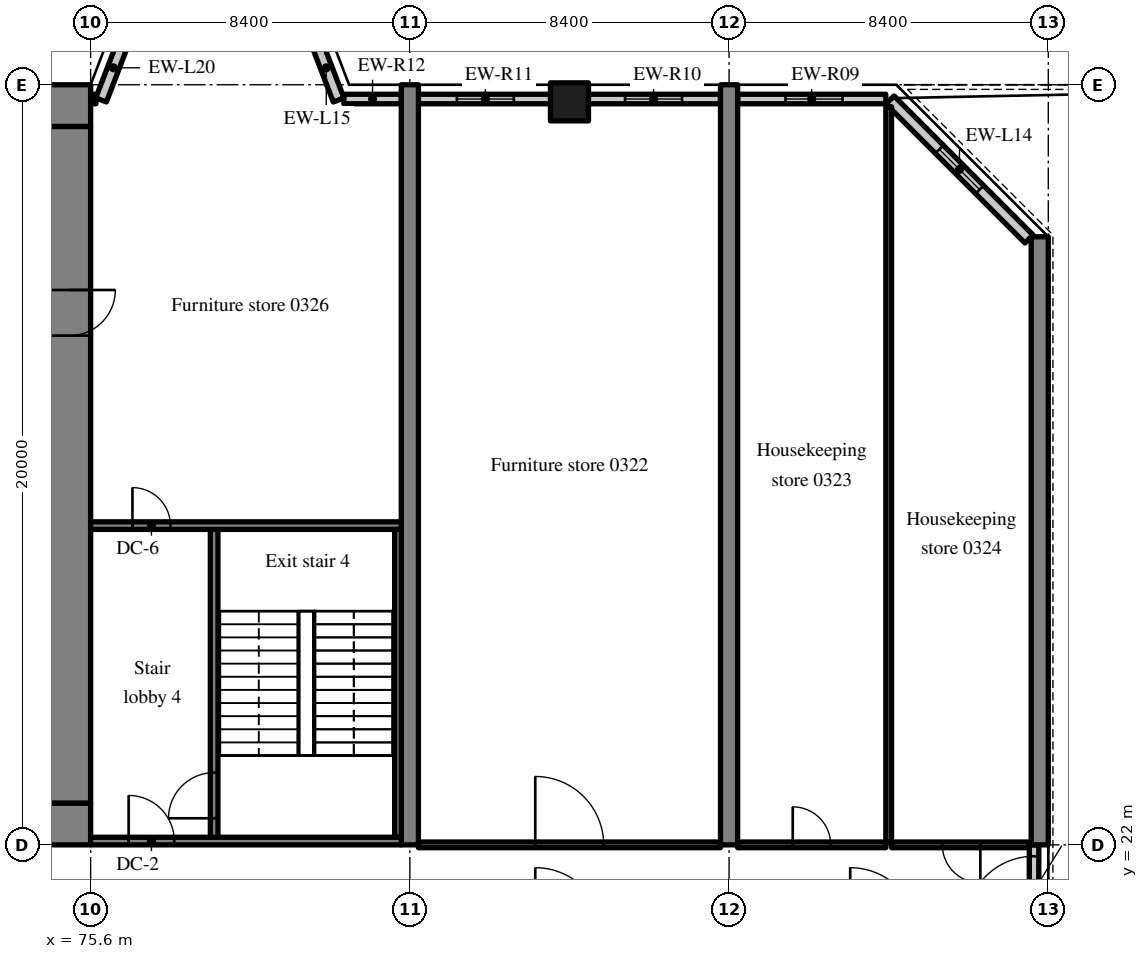
"""IFC4 building model, lengths in metres.
Left out: names, types, materials, properties, quantities, classifications, styles, units other than length and angle.
Written with IfcOpenShell. Run it as: python <this file> out.ifc"""

import sys

from ifc_helpers import new_model, si_unit, direction, frame, frame_2d, origin, origin_2d, place, context, subcontext, project, spatial, rectangle, extrude, source, transform, mapped, element, fill, save


model = new_model("IFC4")
c1 = context("Model", 3, precision=1e-05, world=origin(), true_north=direction((0.0, 1.0)))
c2 = subcontext(c1, "Body", "Model", "MODEL_VIEW")
j1 = project(units=[si_unit("LENGTHUNIT", "METRE"), si_unit("PLANEANGLEUNIT", "RADIAN")], contexts=[c1])
p1 = place(None, origin())
s1 = spatial("IfcSite", under=j1, at=p1, CompositionType="ELEMENT")
p2 = place(p1, origin())
s2 = spatial("IfcBuilding", under=s1, at=p2, CompositionType="ELEMENT")
p3 = place(p2, frame((0.0, 0.0, 18.0)))
s3 = spatial("IfcBuildingStorey", under=s2, at=p3, CompositionType="ELEMENT", Elevation=18.0)
m1 = source(origin(), c2, "Body", "SweptSolid", [
    extrude(rectangle(XDim=50.4, YDim=1.1, at=frame_2d((25.2, 0.0))), origin(), (0.0, 0.0, 1.0), 4.72),
])
p4 = place(p3, frame((25.2, 22.55, 0.0), z_axis=(0.0, 0.0, 1.0), x_axis=(1.0, 0.0, 0.0)))
e1 = element("IfcWall", 1, at=p4, inside=s3, PredefinedType="SHEAR", context=c2, shape_type="MappedRepresentation", body=[
    mapped(m1, transform((0.0, 0.0, 0.0), scale=1.0)),
])
m2 = source(origin(), c2, "Body", "SweptSolid", [
    extrude(rectangle(XDim=1.8, YDim=2.1, at=frame_2d((0.9, 1.05))), frame((0.0, 0.56, 0.0), z_axis=(0.0, -1.0, 0.0), x_axis=(1.0, 0.0, 0.0)), (0.0, 0.0, 1.0), 1.12),
])
p5 = place(p4, frame((15.9, 0.0, 0.0)))
e2 = element("IfcOpeningElement", 2, at=p5, cuts=e1, PredefinedType="OPENING", context=c2, shape_type="MappedRepresentation", body=[
    mapped(m2, transform((0.0, 0.0, 0.0), scale=1.0)),
])
m3 = source(origin(), c2, "Body", "SweptSolid", [
    extrude(rectangle(XDim=1.2, YDim=2.1, at=frame_2d((0.6, 1.05))), frame((0.0, 0.56, 0.0), z_axis=(0.0, -1.0, 0.0), x_axis=(1.0, 0.0, 0.0)), (0.0, 0.0, 1.0), 1.12),
])
p6 = place(p4, frame((27.0, 0.0, 0.0)))
e3 = element("IfcOpeningElement", 3, at=p6, cuts=e1, PredefinedType="OPENING", context=c2, shape_type="MappedRepresentation", body=[
    mapped(m3, transform((0.0, 0.0, 0.0), scale=1.0)),
])
m4 = source(origin(), c2, "Body", "SweptSolid", [
    extrude(rectangle(XDim=0.9, YDim=2.1, at=frame_2d((0.45, 1.05))), frame((0.0, 0.56, 0.0), z_axis=(0.0, -1.0, 0.0), x_axis=(1.0, 0.0, 0.0)), (0.0, 0.0, 1.0), 1.12),
])
p7 = place(p4, frame((34.5, 0.0, 0.0)))
e4 = element("IfcOpeningElement", 4, at=p7, cuts=e1, PredefinedType="OPENING", context=c2, shape_type="MappedRepresentation", body=[
    mapped(m4, transform((0.0, 0.0, 0.0), scale=1.0)),
])
p8 = place(p4, frame((31.5, 0.0, 0.0)))
e5 = element("IfcOpeningElement", 5, at=p8, cuts=e1, PredefinedType="OPENING", context=c2, shape_type="MappedRepresentation", body=[
    mapped(m4, transform((0.0, 0.0, 0.0), scale=1.0)),
])
p9 = place(p4, frame((39.75, 0.0, 0.0)))
e6 = element("IfcOpeningElement", 6, at=p9, cuts=e1, PredefinedType="OPENING", context=c2, shape_type="MappedRepresentation", body=[
    mapped(m4, transform((0.0, 0.0, 0.0), scale=1.0)),
])
p10 = place(p4, frame((36.75, 0.0, 0.0)))
e7 = element("IfcOpeningElement", 7, at=p10, cuts=e1, PredefinedType="OPENING", context=c2, shape_type="MappedRepresentation", body=[
    mapped(m4, transform((0.0, 0.0, 0.0), scale=1.0)),
])
p11 = place(p4, frame((6.425, 0.0, 0.0)))
e8 = element("IfcOpeningElement", 8, at=p11, cuts=e1, PredefinedType="OPENING", context=c2, shape_type="MappedRepresentation", body=[
    mapped(m3, transform((0.0, 0.0, 0.0), scale=1.0)),
])
p12 = place(p4, frame((47.675, 0.0, 0.0)))
e9 = element("IfcOpeningElement", 9, at=p12, cuts=e1, PredefinedType="OPENING", context=c2, shape_type="MappedRepresentation", body=[
    mapped(m3, transform((0.0, 0.0, 0.0), scale=1.0)),
])
p13 = place(p3, frame((25.2, 41.45, 0.0), z_axis=(0.0, 0.0, 1.0), x_axis=(1.0, 0.0, 0.0)))
e10 = element("IfcWall", 10, at=p13, inside=s3, PredefinedType="SHEAR", context=c2, shape_type="MappedRepresentation", body=[
    mapped(m1, transform((0.0, 0.0, 0.0), scale=1.0)),
])
m5 = source(origin(), c2, "Body", "SweptSolid", [
    extrude(rectangle(XDim=17.8, YDim=1.1, at=frame_2d((8.9, 0.0))), origin(), (0.0, 0.0, 1.0), 4.72),
])
p14 = place(p3, frame((75.05, 23.1, 0.0), z_axis=(0.0, 0.0, 1.0), x_axis=(0.0, 1.0, 0.0)))
e11 = element("IfcWall", 11, at=p14, inside=s3, PredefinedType="SHEAR", context=c2, shape_type="MappedRepresentation", body=[
    mapped(m5, transform((0.0, 0.0, 0.0), scale=1.0)),
])
p15 = place(p14, frame((12.3, 0.0, 0.0)))
e12 = element("IfcOpeningElement", 12, at=p15, cuts=e11, PredefinedType="OPENING", context=c2, shape_type="MappedRepresentation", body=[
    mapped(m3, transform((0.0, 0.0, 0.0), scale=1.0)),
])
m6 = source(origin(), c2, "Body", "SweptSolid", [
    extrude(rectangle(XDim=20.0, YDim=0.45, at=frame_2d((10.0, 0.0))), origin(), (0.0, 0.0, 1.0), 4.72),
])
for number, where, z_axis, x_axis in (
    (13, (84.0, 22.0, 0.0), (0.0, 0.0, 1.0), (0.0, 1.0, 0.0)),
    (14, (92.4, 22.0, 0.0), (0.0, 0.0, 1.0), (0.0, 1.0, 0.0)),
):
    element("IfcWall", number, at=place(p3, frame(where, z_axis=z_axis, x_axis=x_axis)), inside=s3, PredefinedType="SHEAR", context=c2, shape_type="MappedRepresentation", body=[
        mapped(m6, transform((0.0, 0.0, 0.0), scale=1.0)),
    ])
m7 = source(origin(), c2, "Body", "SweptSolid", [
    extrude(rectangle(XDim=16.0, YDim=0.45, at=frame_2d((8.0, 0.0))), origin(), (0.0, 0.0, 1.0), 4.72),
])
p16 = place(p3, frame((100.575, 22.0, 0.0), z_axis=(0.0, 0.0, 1.0), x_axis=(0.0, 1.0, 0.0)))
e15 = element("IfcWall", 15, at=p16, inside=s3, PredefinedType="SHEAR", context=c2, shape_type="MappedRepresentation", body=[
    mapped(m7, transform((0.0, 0.0, 0.0), scale=1.0)),
])
m8 = source(origin(), c2, "Body", "SweptSolid", [
    extrude(rectangle(XDim=1.0, YDim=1.0, at=origin_2d()), origin(), (0.0, 0.0, 1.0), 4.72),
])
p17 = place(p3, frame((88.2, 41.55, 0.0), z_axis=(0.0, 0.0, 1.0), x_axis=(1.0, 0.0, 0.0)))
e16 = element("IfcColumn", 16, at=p17, inside=s3, PredefinedType="COLUMN", context=c2, shape_type="MappedRepresentation", body=[
    mapped(m8, transform((0.0, 0.0, 0.0), scale=1.0)),
])
m9 = source(origin(), c2, "Body", "SweptSolid", [
    extrude(rectangle(XDim=2.4, YDim=0.25, at=frame_2d((1.2, 0.0))), origin(), (0.0, 0.0, 1.0), 3.82),
])
p18 = place(p3, frame((100.425, 19.6, 0.0), z_axis=(0.0, 0.0, 1.0), x_axis=(0.0, 1.0, 0.0)))
e17 = element("IfcWall", 17, at=p18, inside=s3, PredefinedType="SOLIDWALL", context=c2, shape_type="MappedRepresentation", body=[
    mapped(m9, transform((0.0, 0.0, 0.0), scale=1.0)),
])
m10 = source(origin(), c2, "Body", "SweptSolid", [
    extrude(rectangle(XDim=1.8, YDim=2.4, at=frame_2d((0.9, 1.2))), frame((0.0, 0.135, 0.0), z_axis=(0.0, -1.0, 0.0), x_axis=(1.0, 0.0, 0.0)), (0.0, 0.0, 1.0), 0.27),
])
p19 = place(p18, frame((0.3, 0.0, 0.0)))
e18 = element("IfcOpeningElement", 18, at=p19, cuts=e17, PredefinedType="OPENING", context=c2, shape_type="MappedRepresentation", body=[
    mapped(m10, transform((0.0, 0.0, 0.0), scale=1.0)),
])
m11 = source(origin(), c2, "Body", "SweptSolid", [
    extrude(rectangle(XDim=5.173, YDim=0.3, at=frame_2d((2.586, 0.0))), origin(), (0.0, 0.0, 1.0), 3.97),
])
p20 = place(p3, frame((100.292, 37.942, 0.0), z_axis=(0.0, 0.0, 1.0), x_axis=(-0.707106781187, 0.707106781187, 0.0)))
e19 = element("IfcWall", 19, at=p20, inside=s3, PredefinedType="SOLIDWALL", context=c2, shape_type="MappedRepresentation", body=[
    mapped(m11, transform((0.0, 0.0, 0.0), scale=1.0)),
])
m12 = source(origin(), c2, "Body", "SweptSolid", [
    extrude(rectangle(XDim=1.5, YDim=1.5, at=frame_2d((0.75, 0.75))), frame((0.0, 0.16, 0.0), z_axis=(0.0, -1.0, 0.0), x_axis=(1.0, 0.0, 0.0)), (0.0, 0.0, 1.0), 0.32),
])
p21 = place(p20, frame((1.836, 0.0, 0.9)))
e20 = element("IfcOpeningElement", 20, at=p21, cuts=e19, PredefinedType="OPENING", context=c2, shape_type="MappedRepresentation", body=[
    mapped(m12, transform((0.0, 0.0, 0.0), scale=1.0)),
])
m13 = source(origin(), c2, "Body", "SweptSolid", [
    extrude(rectangle(XDim=3.9, YDim=0.25, at=frame_2d((1.95, 0.0))), origin(), (0.0, 0.0, 1.0), 3.97),
])
p22 = place(p3, frame((96.525, 41.625, 0.0), z_axis=(0.0, 0.0, 1.0), x_axis=(-1.0, 0.0, 0.0)))
e21 = element("IfcWall", 21, at=p22, inside=s3, PredefinedType="SOLIDWALL", context=c2, shape_type="MappedRepresentation", body=[
    mapped(m13, transform((0.0, 0.0, 0.0), scale=1.0)),
])
m14 = source(origin(), c2, "Body", "SweptSolid", [
    extrude(rectangle(XDim=1.5, YDim=1.5, at=frame_2d((0.75, 0.75))), frame((0.0, 0.135, 0.0), z_axis=(0.0, -1.0, 0.0), x_axis=(1.0, 0.0, 0.0)), (0.0, 0.0, 1.0), 0.27),
])
p23 = place(p22, frame((1.14, 0.0, 0.9)))
e22 = element("IfcOpeningElement", 22, at=p23, cuts=e21, PredefinedType="OPENING", context=c2, shape_type="MappedRepresentation", body=[
    mapped(m14, transform((0.0, 0.0, 0.0), scale=1.0)),
])
m15 = source(origin(), c2, "Body", "SweptSolid", [
    extrude(rectangle(XDim=3.525, YDim=0.25, at=frame_2d((1.763, 0.0))), origin(), (0.0, 0.0, 1.0), 3.97),
])
p24 = place(p3, frame((92.175, 41.625, 0.0), z_axis=(0.0, 0.0, 1.0), x_axis=(-1.0, 0.0, 0.0)))
e23 = element("IfcWall", 23, at=p24, inside=s3, PredefinedType="SOLIDWALL", context=c2, shape_type="MappedRepresentation", body=[
    mapped(m15, transform((0.0, 0.0, 0.0), scale=1.0)),
])
p25 = place(p24, frame((1.012, 0.0, 0.9)))
e24 = element("IfcOpeningElement", 24, at=p25, cuts=e23, PredefinedType="OPENING", context=c2, shape_type="MappedRepresentation", body=[
    mapped(m14, transform((0.0, 0.0, 0.0), scale=1.0)),
])
m16 = source(origin(), c2, "Body", "SweptSolid", [
    extrude(rectangle(XDim=3.525, YDim=0.25, at=frame_2d((1.762, 0.0))), origin(), (0.0, 0.0, 1.0), 3.97),
])
p26 = place(p3, frame((87.75, 41.625, 0.0), z_axis=(0.0, 0.0, 1.0), x_axis=(-1.0, 0.0, 0.0)))
e25 = element("IfcWall", 25, at=p26, inside=s3, PredefinedType="SOLIDWALL", context=c2, shape_type="MappedRepresentation", body=[
    mapped(m16, transform((0.0, 0.0, 0.0), scale=1.0)),
])
p27 = place(p26, frame((1.012, 0.0, 0.9)))
e26 = element("IfcOpeningElement", 26, at=p27, cuts=e25, PredefinedType="OPENING", context=c2, shape_type="MappedRepresentation", body=[
    mapped(m14, transform((0.0, 0.0, 0.0), scale=1.0)),
])
m17 = source(origin(), c2, "Body", "SweptSolid", [
    extrude(rectangle(XDim=1.513, YDim=0.25, at=frame_2d((0.756, 0.0))), origin(), (0.0, 0.0, 1.0), 3.97),
])
p28 = place(p3, frame((83.775, 41.625, 0.0), z_axis=(0.0, 0.0, 1.0), x_axis=(-1.0, 0.0, 0.0)))
e27 = element("IfcWall", 27, at=p28, inside=s3, PredefinedType="SOLIDWALL", context=c2, shape_type="MappedRepresentation", body=[
    mapped(m17, transform((0.0, 0.0, 0.0), scale=1.0)),
])
m18 = source(origin(), c2, "Body", "SweptSolid", [
    extrude(rectangle(XDim=1.812, YDim=0.3, at=frame_2d((0.906, 0.0))), origin(), (0.0, 0.0, 1.0), 4.72),
])
for number, where, z_axis, x_axis in (
    (28, (82.125, 41.6, 0.0), (0.0, 0.0, 1.0), (-0.358, 0.934, 0.0)),
    (29, (76.523, 43.292, 0.0), (0.0, 0.0, 1.0), (-0.358, -0.934, 0.0)),
):
    element("IfcWall", number, at=place(p3, frame(where, z_axis=z_axis, x_axis=x_axis)), inside=s3, PredefinedType="SOLIDWALL", context=c2, shape_type="MappedRepresentation", body=[
        mapped(m18, transform((0.0, 0.0, 0.0), scale=1.0)),
    ])
m19 = source(origin(), c2, "Body", "SweptSolid", [
    extrude(rectangle(XDim=0.138, YDim=0.25, at=frame_2d((0.069, 0.0))), origin(), (0.0, 0.0, 1.0), 3.97),
])
p29 = place(p3, frame((75.738, 41.625, 0.0), z_axis=(0.0, 0.0, 1.0), x_axis=(-1.0, 0.0, 0.0)))
e30 = element("IfcWall", 30, at=p29, inside=s3, PredefinedType="SOLIDWALL", context=c2, shape_type="MappedRepresentation", body=[
    mapped(m19, transform((0.0, 0.0, 0.0), scale=1.0)),
])
m20 = source(origin(), c2, "Body", "SweptSolid", [
    extrude(rectangle(XDim=8.3, YDim=0.2, at=frame_2d((4.15, 0.0))), origin(), (0.0, 0.0, 1.0), 4.72),
])
p30 = place(p3, frame((78.85, 22.1, 0.0), z_axis=(0.0, 0.0, 1.0), x_axis=(0.0, 1.0, 0.0)))
e31 = element("IfcWall", 31, at=p30, inside=s3, PredefinedType="SOLIDWALL", context=c2, shape_type="MappedRepresentation", body=[
    mapped(m20, transform((0.0, 0.0, 0.0), scale=1.0)),
])
m21 = source(origin(), c2, "Body", "SweptSolid", [
    extrude(rectangle(XDim=1.2, YDim=2.1, at=frame_2d((0.6, 1.05))), frame((0.0, 0.11, 0.0), z_axis=(0.0, -1.0, 0.0), x_axis=(1.0, 0.0, 0.0)), (0.0, 0.0, 1.0), 0.22),
])
p31 = place(p30, frame((0.6, 0.0, 0.0)))
e32 = element("IfcOpeningElement", 32, at=p31, cuts=e31, PredefinedType="OPENING", context=c2, shape_type="MappedRepresentation", body=[
    mapped(m21, transform((0.0, 0.0, 0.0), scale=1.0)),
])
m22 = source(origin(), c2, "Body", "SweptSolid", [
    extrude(rectangle(XDim=8.175, YDim=0.2, at=frame_2d((4.087, 0.0))), origin(), (0.0, 0.0, 1.0), 4.72),
])
p32 = place(p3, frame((83.775, 22.1, 0.0), z_axis=(0.0, 0.0, 1.0), x_axis=(-1.0, 0.0, 0.0)))
e33 = element("IfcWall", 33, at=p32, inside=s3, PredefinedType="SOLIDWALL", context=c2, shape_type="MappedRepresentation", body=[
    mapped(m22, transform((0.0, 0.0, 0.0), scale=1.0)),
])
p33 = place(p32, frame((5.975, 0.0, 0.0)))
e34 = element("IfcOpeningElement", 34, at=p33, cuts=e33, PredefinedType="OPENING", context=c2, shape_type="MappedRepresentation", body=[
    mapped(m21, transform((0.0, 0.0, 0.0), scale=1.0)),
])
p34 = place(p3, frame((83.775, 30.4, 0.0), z_axis=(0.0, 0.0, 1.0), x_axis=(-1.0, 0.0, 0.0)))
e35 = element("IfcWall", 35, at=p34, inside=s3, PredefinedType="SOLIDWALL", context=c2, shape_type="MappedRepresentation", body=[
    mapped(m22, transform((0.0, 0.0, 0.0), scale=1.0)),
])
m23 = source(origin(), c2, "Body", "SweptSolid", [
    extrude(rectangle(XDim=1.0, YDim=2.1, at=frame_2d((0.5, 1.05))), frame((0.0, 0.11, 0.0), z_axis=(0.0, -1.0, 0.0), x_axis=(1.0, 0.0, 0.0)), (0.0, 0.0, 1.0), 0.22),
])
p35 = place(p34, frame((6.075, 0.0, 0.0)))
e36 = element("IfcOpeningElement", 36, at=p35, cuts=e35, PredefinedType="OPENING", context=c2, shape_type="MappedRepresentation", body=[
    mapped(m23, transform((0.0, 0.0, 0.0), scale=1.0)),
])
m24 = source(origin(), c2, "Body", "SweptSolid", [
    extrude(rectangle(XDim=8.1, YDim=0.175, at=frame_2d((4.05, 0.0))), origin(), (0.0, 0.0, 1.0), 4.72),
])
p36 = place(p3, frame((83.688, 22.2, 0.0), z_axis=(0.0, 0.0, 1.0), x_axis=(0.0, 1.0, 0.0)))
e37 = element("IfcWall", 37, at=p36, inside=s3, PredefinedType="SOLIDWALL", context=c2, shape_type="MappedRepresentation", body=[
    mapped(m24, transform((0.0, 0.0, 0.0), scale=1.0)),
])
m25 = source(origin(), c2, "Body", "SweptSolid", [
    extrude(rectangle(XDim=7.95, YDim=0.15, at=frame_2d((3.975, 0.0))), origin(), (0.0, 0.0, 1.0), 4.02),
])
p37 = place(p3, frame((84.225, 22.0, 0.0), z_axis=(0.0, 0.0, 1.0), x_axis=(1.0, 0.0, 0.0)))
e38 = element("IfcWall", 38, at=p37, inside=s3, PredefinedType="PARTITIONING", context=c2, shape_type="MappedRepresentation", body=[
    mapped(m25, transform((0.0, 0.0, 0.0), scale=1.0)),
])
m26 = source(origin(), c2, "Body", "SweptSolid", [
    extrude(rectangle(XDim=1.8, YDim=2.1, at=frame_2d((0.9, 1.05))), frame((0.0, 0.085, 0.0), z_axis=(0.0, -1.0, 0.0), x_axis=(1.0, 0.0, 0.0)), (0.0, 0.0, 1.0), 0.17),
])
p38 = place(p37, frame((3.075, 0.0, 0.0)))
e39 = element("IfcOpeningElement", 39, at=p38, cuts=e38, PredefinedType="OPENING", context=c2, shape_type="MappedRepresentation", body=[
    mapped(m26, transform((0.0, 0.0, 0.0), scale=1.0)),
])
m27 = source(origin(), c2, "Body", "SweptSolid", [
    extrude(rectangle(XDim=3.9, YDim=0.15, at=frame_2d((1.95, 0.0))), origin(), (0.0, 0.0, 1.0), 4.02),
])
p39 = place(p3, frame((92.625, 22.0, 0.0), z_axis=(0.0, 0.0, 1.0), x_axis=(1.0, 0.0, 0.0)))
e40 = element("IfcWall", 40, at=p39, inside=s3, PredefinedType="PARTITIONING", context=c2, shape_type="MappedRepresentation", body=[
    mapped(m27, transform((0.0, 0.0, 0.0), scale=1.0)),
])
m28 = source(origin(), c2, "Body", "SweptSolid", [
    extrude(rectangle(XDim=1.0, YDim=2.1, at=frame_2d((0.5, 1.05))), frame((0.0, 0.085, 0.0), z_axis=(0.0, -1.0, 0.0), x_axis=(1.0, 0.0, 0.0)), (0.0, 0.0, 1.0), 0.17),
])
p40 = place(p39, frame((1.45, 0.0, 0.0)))
e41 = element("IfcOpeningElement", 41, at=p40, cuts=e40, PredefinedType="OPENING", context=c2, shape_type="MappedRepresentation", body=[
    mapped(m28, transform((0.0, 0.0, 0.0), scale=1.0)),
])
m29 = source(origin(), c2, "Body", "SweptSolid", [
    extrude(rectangle(XDim=3.625, YDim=0.15, at=frame_2d((1.812, 0.0))), origin(), (0.0, 0.0, 1.0), 4.02),
])
p41 = place(p3, frame((96.675, 22.0, 0.0), z_axis=(0.0, 0.0, 1.0), x_axis=(1.0, 0.0, 0.0)))
e42 = element("IfcWall", 42, at=p41, inside=s3, PredefinedType="PARTITIONING", context=c2, shape_type="MappedRepresentation", body=[
    mapped(m29, transform((0.0, 0.0, 0.0), scale=1.0)),
])
p42 = place(p41, frame((1.337, 0.0, 0.0)))
e43 = element("IfcOpeningElement", 43, at=p42, cuts=e42, PredefinedType="OPENING", context=c2, shape_type="MappedRepresentation", body=[
    mapped(m28, transform((0.0, 0.0, 0.0), scale=1.0)),
])
m30 = source(origin(), c2, "Body", "SweptSolid", [
    extrude(rectangle(XDim=19.347, YDim=0.15, at=frame_2d((9.674, 0.0))), origin(), (0.0, 0.0, 1.0), 4.72),
])
p43 = place(p3, frame((96.6, 22.075, 0.0), z_axis=(0.0, 0.0, 1.0), x_axis=(0.0, 1.0, 0.0)))
e44 = element("IfcWall", 44, at=p43, inside=s3, PredefinedType="PARTITIONING", context=c2, shape_type="MappedRepresentation", body=[
    mapped(m30, transform((0.0, 0.0, 0.0), scale=1.0)),
])
m31 = source(origin(), c2, "Body", "SweptSolid", [
    extrude(rectangle(XDim=1.8, YDim=2.4, at=frame_2d((0.9, 1.2))), frame((0.0, 0.025, 0.0), z_axis=(0.0, -1.0, 0.0), x_axis=(1.0, 0.0, 0.0)), (0.0, 0.0, 1.0), 0.05),
])
p44 = place(p19, origin())
e45 = element("IfcDoor", 45, at=p44, inside=s3, OperationType="DOUBLE_DOOR_SINGLE_SWING", PredefinedType="DOOR", context=c2, shape_type="MappedRepresentation", body=[
    mapped(m31, transform((0.0, 0.0, 0.0), scale=1.0)),
])
fill(e18, e45)
m32 = source(origin(), c2, "Body", "SweptSolid", [
    extrude(rectangle(XDim=1.5, YDim=1.5, at=frame_2d((0.75, 0.75))), frame((0.0, 0.03, 0.0), z_axis=(0.0, -1.0, 0.0), x_axis=(1.0, 0.0, 0.0)), (0.0, 0.0, 1.0), 0.06),
])
p45 = place(p21, origin())
e46 = element("IfcWindow", 46, at=p45, inside=s3, PartitioningType="SINGLE_PANEL", PredefinedType="WINDOW", context=c2, shape_type="MappedRepresentation", body=[
    mapped(m32, transform((0.0, 0.0, 0.0), scale=1.0)),
])
fill(e20, e46)
p46 = place(p23, origin())
e47 = element("IfcWindow", 47, at=p46, inside=s3, PartitioningType="SINGLE_PANEL", PredefinedType="WINDOW", context=c2, shape_type="MappedRepresentation", body=[
    mapped(m32, transform((0.0, 0.0, 0.0), scale=1.0)),
])
fill(e22, e47)
p47 = place(p25, origin())
e48 = element("IfcWindow", 48, at=p47, inside=s3, PartitioningType="SINGLE_PANEL", PredefinedType="WINDOW", context=c2, shape_type="MappedRepresentation", body=[
    mapped(m32, transform((0.0, 0.0, 0.0), scale=1.0)),
])
fill(e24, e48)
p48 = place(p27, origin())
e49 = element("IfcWindow", 49, at=p48, inside=s3, PartitioningType="SINGLE_PANEL", PredefinedType="WINDOW", context=c2, shape_type="MappedRepresentation", body=[
    mapped(m32, transform((0.0, 0.0, 0.0), scale=1.0)),
])
fill(e26, e49)
m33 = source(origin(), c2, "Body", "SweptSolid", [
    extrude(rectangle(XDim=1.2, YDim=2.1, at=frame_2d((0.6, 1.05))), frame((0.0, 0.025, 0.0), z_axis=(0.0, -1.0, 0.0), x_axis=(1.0, 0.0, 0.0)), (0.0, 0.0, 1.0), 0.05),
])
p49 = place(p15, origin())
e50 = element("IfcDoor", 50, at=p49, inside=s3, OperationType="SINGLE_SWING_RIGHT", PredefinedType="DOOR", context=c2, shape_type="MappedRepresentation", body=[
    mapped(m33, transform((0.0, 0.0, 0.0), scale=1.0)),
])
fill(e12, e50)
p50 = place(p31, origin())
e51 = element("IfcDoor", 51, at=p50, inside=s3, OperationType="SINGLE_SWING_LEFT", PredefinedType="DOOR", context=c2, shape_type="MappedRepresentation", body=[
    mapped(m33, transform((0.0, 0.0, 0.0), scale=1.0)),
])
fill(e32, e51)
p51 = place(p33, origin())
e52 = element("IfcDoor", 52, at=p51, inside=s3, OperationType="SINGLE_SWING_RIGHT", PredefinedType="DOOR", context=c2, shape_type="MappedRepresentation", body=[
    mapped(m33, transform((0.0, 0.0, 0.0), scale=1.0)),
])
fill(e34, e52)
m34 = source(origin(), c2, "Body", "SweptSolid", [
    extrude(rectangle(XDim=1.0, YDim=2.1, at=frame_2d((0.5, 1.05))), frame((0.0, 0.025, 0.0), z_axis=(0.0, -1.0, 0.0), x_axis=(1.0, 0.0, 0.0)), (0.0, 0.0, 1.0), 0.05),
])
p52 = place(p35, origin())
e53 = element("IfcDoor", 53, at=p52, inside=s3, OperationType="SINGLE_SWING_RIGHT", PredefinedType="DOOR", context=c2, shape_type="MappedRepresentation", body=[
    mapped(m34, transform((0.0, 0.0, 0.0), scale=1.0)),
])
fill(e36, e53)
m35 = source(origin(), c2, "Body", "SweptSolid", [
    extrude(rectangle(XDim=1.8, YDim=2.1, at=frame_2d((0.9, 1.05))), frame((0.0, 0.025, 0.0), z_axis=(0.0, -1.0, 0.0), x_axis=(1.0, 0.0, 0.0)), (0.0, 0.0, 1.0), 0.05),
])
p53 = place(p38, origin())
e54 = element("IfcDoor", 54, at=p53, inside=s3, OperationType="DOUBLE_DOOR_SINGLE_SWING", PredefinedType="DOOR", context=c2, shape_type="MappedRepresentation", body=[
    mapped(m35, transform((0.0, 0.0, 0.0), scale=1.0)),
])
fill(e39, e54)
p54 = place(p40, origin())
e55 = element("IfcDoor", 55, at=p54, inside=s3, OperationType="SINGLE_SWING_LEFT", PredefinedType="DOOR", context=c2, shape_type="MappedRepresentation", body=[
    mapped(m34, transform((0.0, 0.0, 0.0), scale=1.0)),
])
fill(e41, e55)
p55 = place(p42, origin())
e56 = element("IfcDoor", 56, at=p55, inside=s3, OperationType="SINGLE_SWING_RIGHT", PredefinedType="DOOR", context=c2, shape_type="MappedRepresentation", body=[
    mapped(m34, transform((0.0, 0.0, 0.0), scale=1.0)),
])
fill(e43, e56)
save(model, sys.argv[1])
